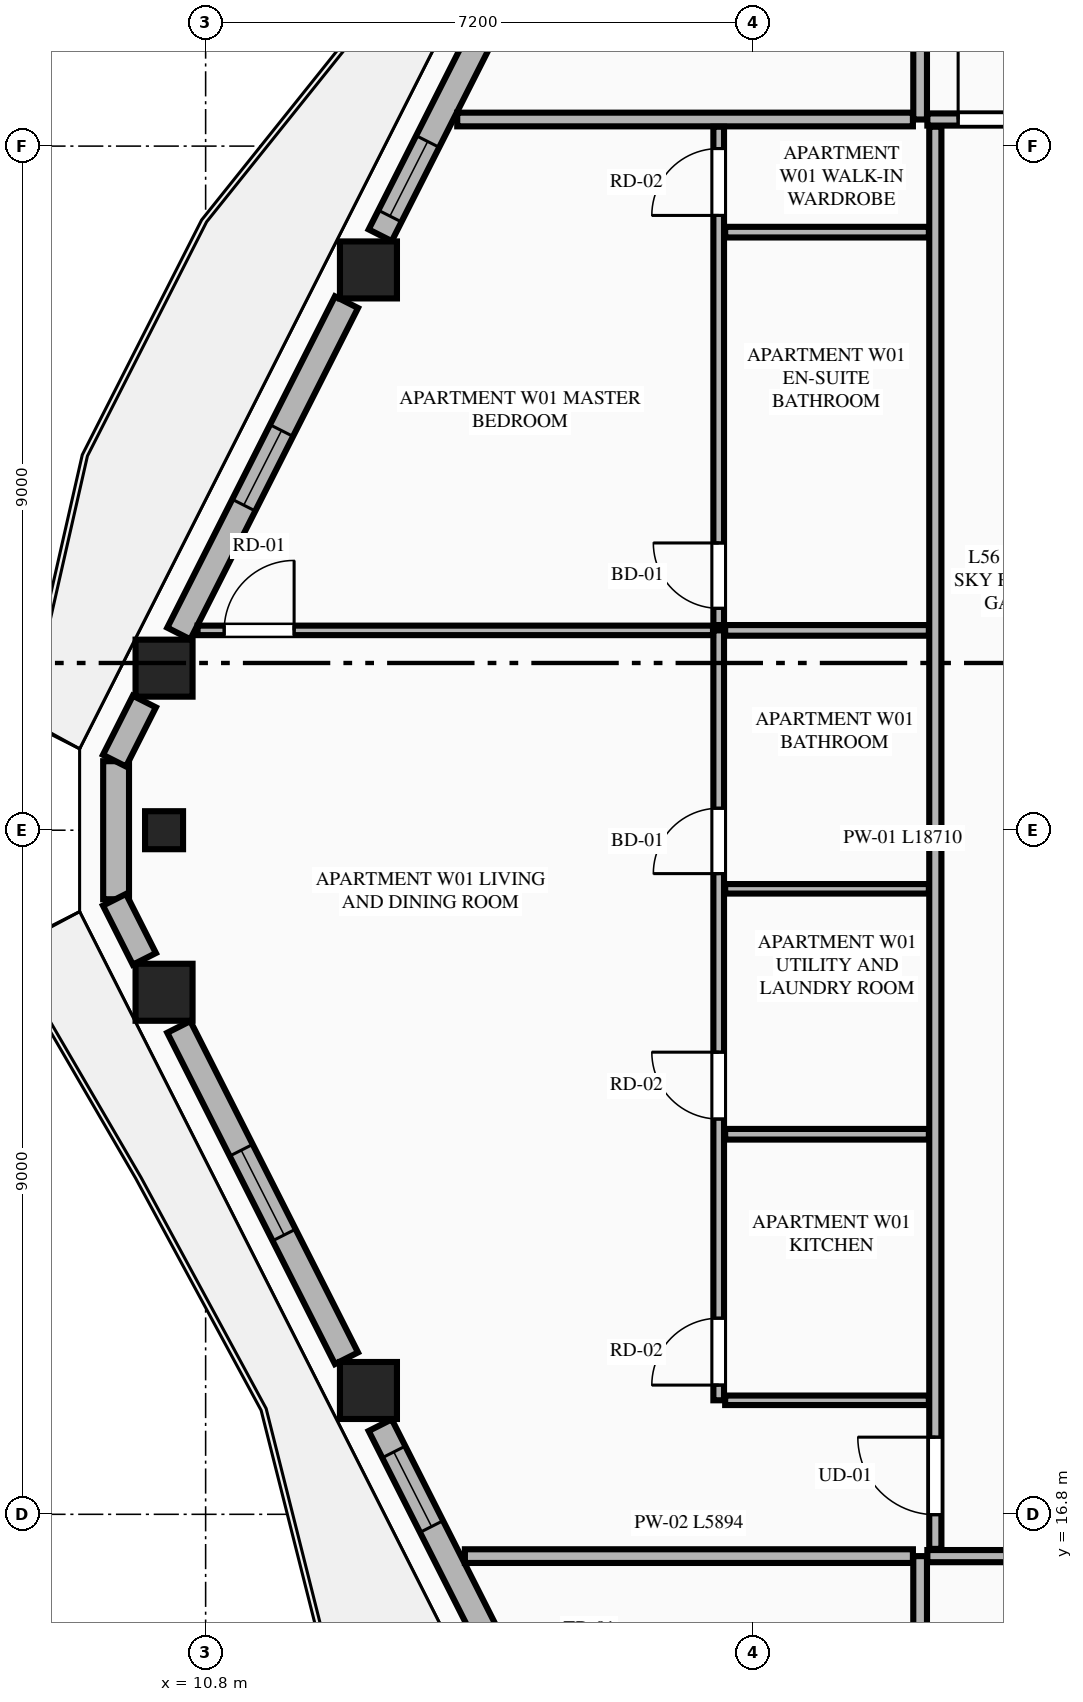
"""IFC4 building model, lengths in metres.
Left out: names, types, materials, properties, quantities, classifications, styles, units other than length and angle.
Written with IfcOpenShell. Run it as: python <this file> out.ifc"""

import sys

from ifc_helpers import new_model, si_unit, direction, frame, frame_2d, origin, origin_2d, place, context, subcontext, project, spatial, rectangle, extrude, element, fill, save


model = new_model("IFC4")
c1 = context("Model", 3, precision=1e-05, world=origin(), true_north=direction((0.0, 1.0)))
c2 = subcontext(c1, "Body", "Model", "MODEL_VIEW")
j1 = project(units=[si_unit("LENGTHUNIT", "METRE"), si_unit("PLANEANGLEUNIT", "RADIAN")], contexts=[c1])
p1 = place(None, origin())
s1 = spatial("IfcSite", under=j1, at=p1, CompositionType="ELEMENT")
p2 = place(p1, origin())
s2 = spatial("IfcBuilding", under=s1, at=p2, CompositionType="ELEMENT")
p3 = place(p2, frame((0.0, 0.0, 210.95)))
s3 = spatial("IfcBuildingStorey", under=s2, at=p3, CompositionType="ELEMENT", Elevation=210.95)
for number, where, z_axis, x_axis in (
    (1, (12.942, 33.171, 0.0), (0.0, 0.0, 1.0), (1.0, 0.0, 0.0)),
    (2, (10.253, 27.932, 0.0), (0.0, 0.0, 1.0), (1.0, 0.0, 0.0)),
    (3, (10.253, 23.668, 0.0), (0.0, 0.0, 1.0), (1.0, 0.0, 0.0)),
    (4, (12.942, 18.429, 0.0), (0.0, 0.0, 1.0), (1.0, 0.0, 0.0)),
):
    element("IfcColumn", number, at=place(p3, frame(where, z_axis=z_axis, x_axis=x_axis)), inside=s3, PredefinedType="COLUMN", context=c2, shape_type="SweptSolid", body=[
        extrude(rectangle(XDim=0.75, YDim=0.75, at=origin_2d()), origin(), (0.0, 0.0, 1.0), 3.55),
    ])
p4 = place(p3, frame((10.253, 25.8, 0.0), z_axis=(0.0, 0.0, 1.0), x_axis=(0.0, -1.0, 0.0)))
e5 = element("IfcColumn", 5, at=p4, inside=s3, PredefinedType="PILASTER", context=c2, shape_type="SweptSolid", body=[
    extrude(rectangle(XDim=0.5, YDim=0.35, at=origin_2d()), origin(), (0.0, 0.0, 1.0), 3.55),
])
p5 = place(p3, frame((9.622, 26.708, 0.0), z_axis=(0.0, 0.0, 1.0), x_axis=(0.0, -1.0, 0.0)))
e6 = element("IfcWall", 6, at=p5, inside=s3, PredefinedType="STANDARD", context=c2, shape_type="SweptSolid", body=[
    extrude(rectangle(XDim=1.816, YDim=0.34, at=frame_2d((0.908, 0.0))), origin(), (0.0, 0.0, 1.0), 3.35),
])
p6 = place(p3, frame((15.397, 38.173, 0.0), z_axis=(0.0, 0.0, 1.0), x_axis=(-0.451444616922, -0.892299141461, 0.0)))
e7 = element("IfcWall", 7, at=p6, inside=s3, PredefinedType="STANDARD", context=c2, shape_type="SweptSolid", body=[
    extrude(rectangle(XDim=5.095, YDim=0.34, at=frame_2d((2.547, 0.0))), origin(), (0.0, 0.0, 1.0), 2.883),
])
p7 = place(p6, frame((1.019, 0.0, 0.0)))
e8 = element("IfcOpeningElement", 8, at=p7, cuts=e7, PredefinedType="OPENING", context=c2, shape_type="SweptSolid", body=[
    extrude(rectangle(XDim=1.1, YDim=2.25, at=frame_2d((0.55, 1.125))), frame((0.0, 0.18, 0.0), z_axis=(0.0, -1.0, 0.0), x_axis=(1.0, 0.0, 0.0)), (0.0, 0.0, 1.0), 0.36),
])
p8 = place(p6, frame((3.712, 0.0, 0.75)))
e9 = element("IfcOpeningElement", 9, at=p8, cuts=e7, PredefinedType="OPENING", context=c2, shape_type="SweptSolid", body=[
    extrude(rectangle(XDim=1.1, YDim=1.983, at=frame_2d((0.55, 0.991))), frame((0.0, 0.18, 0.0), z_axis=(0.0, -1.0, 0.0), x_axis=(1.0, 0.0, 0.0)), (0.0, 0.0, 1.0), 0.36),
])
p9 = place(p3, frame((12.653, 32.747, 0.0), z_axis=(0.0, 0.0, 1.0), x_axis=(-0.451545895749, -0.892247893824, 0.0)))
e10 = element("IfcWall", 10, at=p9, inside=s3, PredefinedType="STANDARD", context=c2, shape_type="SweptSolid", body=[
    extrude(rectangle(XDim=4.885, YDim=0.34, at=frame_2d((2.443, 0.0))), origin(), (0.0, 0.0, 1.0), 2.883),
])
p10 = place(p9, frame((1.893, 0.0, 0.75)))
e11 = element("IfcOpeningElement", 11, at=p10, cuts=e10, PredefinedType="OPENING", context=c2, shape_type="SweptSolid", body=[
    extrude(rectangle(XDim=1.1, YDim=1.983, at=frame_2d((0.55, 0.991))), frame((0.0, 0.18, 0.0), z_axis=(0.0, -1.0, 0.0), x_axis=(1.0, 0.0, 0.0)), (0.0, 0.0, 1.0), 0.36),
])
p11 = place(p3, frame((9.994, 27.493, 0.0), z_axis=(0.0, 0.0, 1.0), x_axis=(-0.450796198004, -0.892626902947, 0.0)))
e12 = element("IfcWall", 12, at=p11, inside=s3, PredefinedType="STANDARD", context=c2, shape_type="SweptSolid", body=[
    extrude(rectangle(XDim=0.871, YDim=0.34, at=frame_2d((0.436, 0.0))), origin(), (0.0, 0.0, 1.0), 3.35),
])
p12 = place(p3, frame((9.601, 24.885, 0.0), z_axis=(0.0, 0.0, 1.0), x_axis=(0.450683483537, -0.892683817299, 0.0)))
e13 = element("IfcWall", 13, at=p12, inside=s3, PredefinedType="STANDARD", context=c2, shape_type="SweptSolid", body=[
    extrude(rectangle(XDim=0.872, YDim=0.34, at=frame_2d((0.436, 0.0))), origin(), (0.0, 0.0, 1.0), 3.35),
])
p13 = place(p3, frame((10.447, 23.212, 0.0), z_axis=(0.0, 0.0, 1.0), x_axis=(0.451566029745, -0.892237704191, 0.0)))
e14 = element("IfcWall", 14, at=p13, inside=s3, PredefinedType="STANDARD", context=c2, shape_type="SweptSolid", body=[
    extrude(rectangle(XDim=4.885, YDim=0.34, at=frame_2d((2.443, 0.0))), origin(), (0.0, 0.0, 1.0), 2.883),
])
p14 = place(p13, frame((1.818, 0.0, 0.75)))
e15 = element("IfcOpeningElement", 15, at=p14, cuts=e14, PredefinedType="OPENING", context=c2, shape_type="SweptSolid", body=[
    extrude(rectangle(XDim=1.25, YDim=1.95, at=frame_2d((0.625, 0.975))), frame((0.0, 0.18, 0.0), z_axis=(0.0, -1.0, 0.0), x_axis=(1.0, 0.0, 0.0)), (0.0, 0.0, 1.0), 0.36),
])
p15 = place(p3, frame((13.097, 17.973, 0.0), z_axis=(0.0, 0.0, 1.0), x_axis=(0.451463920536, -0.892289374841, 0.0)))
e16 = element("IfcWall", 16, at=p15, inside=s3, PredefinedType="STANDARD", context=c2, shape_type="SweptSolid", body=[
    extrude(rectangle(XDim=5.095, YDim=0.34, at=frame_2d((2.547, 0.0))), origin(), (0.0, 0.0, 1.0), 2.883),
])
p16 = place(p15, frame((3.088, 0.0, 0.0)))
e17 = element("IfcOpeningElement", 17, at=p16, cuts=e16, PredefinedType="OPENING", context=c2, shape_type="SweptSolid", body=[
    extrude(rectangle(XDim=1.1, YDim=2.25, at=frame_2d((0.55, 1.125))), frame((0.0, 0.18, 0.0), z_axis=(0.0, -1.0, 0.0), x_axis=(1.0, 0.0, 0.0)), (0.0, 0.0, 1.0), 0.36),
])
p17 = place(p15, frame((0.395, 0.0, 0.75)))
e18 = element("IfcOpeningElement", 18, at=p17, cuts=e16, PredefinedType="OPENING", context=c2, shape_type="SweptSolid", body=[
    extrude(rectangle(XDim=1.1, YDim=1.983, at=frame_2d((0.55, 0.991))), frame((0.0, 0.18, 0.0), z_axis=(0.0, -1.0, 0.0), x_axis=(1.0, 0.0, 0.0)), (0.0, 0.0, 1.0), 0.36),
])
p18 = place(p3, frame((20.2, 5.968, 0.0), z_axis=(0.0, 0.0, 1.0), x_axis=(0.0, 1.0, 0.0)))
e19 = element("IfcWall", 19, at=p18, inside=s3, PredefinedType="PARTITIONING", context=c2, shape_type="SweptSolid", body=[
    extrude(rectangle(XDim=10.282, YDim=0.18, at=frame_2d((5.141, 0.0))), origin(), (0.0, 0.0, 1.0), 3.35),
])
p19 = place(p3, frame((20.295, 16.25, 0.0), z_axis=(0.0, 0.0, 1.0), x_axis=(1.0, 0.0, 0.0)))
e20 = element("IfcWall", 20, at=p19, inside=s3, PredefinedType="PARTITIONING", context=c2, shape_type="SweptSolid", body=[
    extrude(rectangle(XDim=24.21, YDim=0.16, at=frame_2d((12.105, 0.0))), origin(), (0.0, 0.0, 1.0), 3.35),
])
p20 = place(p19, frame((22.005, 0.0, 0.0)))
e21 = element("IfcOpeningElement", 21, at=p20, cuts=e20, PredefinedType="OPENING", context=c2, shape_type="SweptSolid", body=[
    extrude(rectangle(XDim=1.02, YDim=2.25, at=frame_2d((0.51, 1.125))), frame((0.0, 0.09, 0.0), z_axis=(0.0, -1.0, 0.0), x_axis=(1.0, 0.0, 0.0)), (0.0, 0.0, 1.0), 0.18),
])
p21 = place(p3, frame((20.2, 35.15, 0.0), z_axis=(0.0, 0.0, 1.0), x_axis=(0.0, 1.0, 0.0)))
e22 = element("IfcWall", 22, at=p21, inside=s3, PredefinedType="PARTITIONING", context=c2, shape_type="SweptSolid", body=[
    extrude(rectangle(XDim=10.482, YDim=0.18, at=frame_2d((5.241, 0.0))), origin(), (0.0, 0.0, 1.0), 3.35),
])
p22 = place(p3, frame((20.295, 35.15, 0.0), z_axis=(0.0, 0.0, 1.0), x_axis=(1.0, 0.0, 0.0)))
e23 = element("IfcWall", 23, at=p22, inside=s3, PredefinedType="PARTITIONING", context=c2, shape_type="SweptSolid", body=[
    extrude(rectangle(XDim=24.21, YDim=0.16, at=frame_2d((12.105, 0.0))), origin(), (0.0, 0.0, 1.0), 3.35),
])
p23 = place(p22, frame((0.405, 0.0, 0.0)))
e24 = element("IfcOpeningElement", 24, at=p23, cuts=e23, PredefinedType="OPENING", context=c2, shape_type="SweptSolid", body=[
    extrude(rectangle(XDim=1.35, YDim=2.35, at=frame_2d((0.675, 1.175))), frame((0.0, 0.09, 0.0), z_axis=(0.0, -1.0, 0.0), x_axis=(1.0, 0.0, 0.0)), (0.0, 0.0, 1.0), 0.18),
])
p24 = place(p3, frame((14.211, 16.25, 0.0), z_axis=(0.0, 0.0, 1.0), x_axis=(1.0, 0.0, 0.0)))
e25 = element("IfcWall", 25, at=p24, inside=s3, PredefinedType="PARTITIONING", context=c2, shape_type="SweptSolid", body=[
    extrude(rectangle(XDim=5.894, YDim=0.18, at=frame_2d((2.947, 0.0))), origin(), (0.0, 0.0, 1.0), 3.35),
])
p25 = place(p3, frame((14.11, 35.15, 0.0), z_axis=(0.0, 0.0, 1.0), x_axis=(1.0, 0.0, 0.0)))
e26 = element("IfcWall", 26, at=p25, inside=s3, PredefinedType="PARTITIONING", context=c2, shape_type="SweptSolid", body=[
    extrude(rectangle(XDim=5.995, YDim=0.18, at=frame_2d((2.998, 0.0))), origin(), (0.0, 0.0, 1.0), 3.35),
])
p26 = place(p3, frame((20.4, 16.345, 0.0), z_axis=(0.0, 0.0, 1.0), x_axis=(0.0, 1.0, 0.0)))
e27 = element("IfcWall", 27, at=p26, inside=s3, PredefinedType="PARTITIONING", context=c2, shape_type="SweptSolid", body=[
    extrude(rectangle(XDim=18.71, YDim=0.16, at=frame_2d((9.355, 0.0))), origin(), (0.0, 0.0, 1.0), 3.35),
])
p27 = place(p26, frame((0.45, 0.0, 0.0)))
e28 = element("IfcOpeningElement", 28, at=p27, cuts=e27, PredefinedType="OPENING", context=c2, shape_type="SweptSolid", body=[
    extrude(rectangle(XDim=1.02, YDim=2.25, at=frame_2d((0.51, 1.125))), frame((0.0, 0.09, 0.0), z_axis=(0.0, -1.0, 0.0), x_axis=(1.0, 0.0, 0.0)), (0.0, 0.0, 1.0), 0.18),
])
p28 = place(p3, frame((17.635, 18.3, 0.0), z_axis=(0.0, 0.0, 1.0), x_axis=(1.0, 0.0, 0.0)))
e29 = element("IfcWall", 29, at=p28, inside=s3, PredefinedType="PARTITIONING", context=c2, shape_type="SweptSolid", body=[
    extrude(rectangle(XDim=2.68, YDim=0.125, at=frame_2d((1.34, 0.0))), origin(), (0.0, 0.0, 1.0), 2.807),
])
p29 = place(p3, frame((17.55, 18.3, 0.0), z_axis=(0.0, 0.0, 1.0), x_axis=(0.0, 1.0, 0.0)))
e30 = element("IfcWall", 30, at=p29, inside=s3, PredefinedType="PLUMBINGWALL", context=c2, shape_type="SweptSolid", body=[
    extrude(rectangle(XDim=10.129, YDim=0.14, at=frame_2d((5.064, 0.0))), origin(), (0.0, 0.0, 1.0), 3.35),
])
p30 = place(p29, frame((0.2, 0.0, 0.0)))
e31 = element("IfcOpeningElement", 31, at=p30, cuts=e30, PredefinedType="OPENING", context=c2, shape_type="SweptSolid", body=[
    extrude(rectangle(XDim=0.88, YDim=2.15, at=frame_2d((0.44, 1.075))), frame((0.0, 0.08, 0.0), z_axis=(0.0, -1.0, 0.0), x_axis=(1.0, 0.0, 0.0)), (0.0, 0.0, 1.0), 0.16),
])
p31 = place(p29, frame((3.7, 0.0, 0.0)))
e32 = element("IfcOpeningElement", 32, at=p31, cuts=e30, PredefinedType="OPENING", context=c2, shape_type="SweptSolid", body=[
    extrude(rectangle(XDim=0.88, YDim=2.15, at=frame_2d((0.44, 1.075))), frame((0.0, 0.08, 0.0), z_axis=(0.0, -1.0, 0.0), x_axis=(1.0, 0.0, 0.0)), (0.0, 0.0, 1.0), 0.16),
])
p32 = place(p29, frame((6.929, 0.0, 0.0)))
e33 = element("IfcOpeningElement", 33, at=p32, cuts=e30, PredefinedType="OPENING", context=c2, shape_type="SweptSolid", body=[
    extrude(rectangle(XDim=0.86, YDim=2.1, at=frame_2d((0.43, 1.05))), frame((0.0, 0.08, 0.0), z_axis=(0.0, -1.0, 0.0), x_axis=(1.0, 0.0, 0.0)), (0.0, 0.0, 1.0), 0.16),
])
p33 = place(p3, frame((17.55, 28.499, 0.0), z_axis=(0.0, 0.0, 1.0), x_axis=(0.0, 1.0, 0.0)))
e34 = element("IfcWall", 34, at=p33, inside=s3, PredefinedType="PLUMBINGWALL", context=c2, shape_type="SweptSolid", body=[
    extrude(rectangle(XDim=6.556, YDim=0.14, at=frame_2d((3.278, 0.0))), origin(), (0.0, 0.0, 1.0), 3.35),
])
p34 = place(p33, frame((0.22, 0.0, 0.0)))
e35 = element("IfcOpeningElement", 35, at=p34, cuts=e34, PredefinedType="OPENING", context=c2, shape_type="SweptSolid", body=[
    extrude(rectangle(XDim=0.86, YDim=2.1, at=frame_2d((0.43, 1.05))), frame((0.0, 0.08, 0.0), z_axis=(0.0, -1.0, 0.0), x_axis=(1.0, 0.0, 0.0)), (0.0, 0.0, 1.0), 0.16),
])
p35 = place(p33, frame((5.389, 0.0, 0.0)))
e36 = element("IfcOpeningElement", 36, at=p35, cuts=e34, PredefinedType="OPENING", context=c2, shape_type="SweptSolid", body=[
    extrude(rectangle(XDim=0.88, YDim=2.15, at=frame_2d((0.44, 1.075))), frame((0.0, 0.08, 0.0), z_axis=(0.0, -1.0, 0.0), x_axis=(1.0, 0.0, 0.0)), (0.0, 0.0, 1.0), 0.16),
])
p36 = place(p3, frame((17.635, 28.429, 0.0), z_axis=(0.0, 0.0, 1.0), x_axis=(1.0, 0.0, 0.0)))
e37 = element("IfcWall", 37, at=p36, inside=s3, PredefinedType="PLUMBINGWALL", context=c2, shape_type="SweptSolid", body=[
    extrude(rectangle(XDim=2.68, YDim=0.14, at=frame_2d((1.34, 0.0))), origin(), (0.0, 0.0, 1.0), 3.35),
])
p37 = place(p3, frame((10.694, 28.429, 0.0), z_axis=(0.0, 0.0, 1.0), x_axis=(1.0, 0.0, 0.0)))
e38 = element("IfcWall", 38, at=p37, inside=s3, PredefinedType="PARTITIONING", context=c2, shape_type="SweptSolid", body=[
    extrude(rectangle(XDim=6.781, YDim=0.125, at=frame_2d((3.391, 0.0))), origin(), (0.0, 0.0, 1.0), 3.35),
])
p38 = place(p37, frame((0.35, 0.0, 0.0)))
e39 = element("IfcOpeningElement", 39, at=p38, cuts=e38, PredefinedType="OPENING", context=c2, shape_type="SweptSolid", body=[
    extrude(rectangle(XDim=0.92, YDim=2.15, at=frame_2d((0.46, 1.075))), frame((0.0, 0.073, 0.0), z_axis=(0.0, -1.0, 0.0), x_axis=(1.0, 0.0, 0.0)), (0.0, 0.0, 1.0), 0.145),
])
p39 = place(p3, frame((17.635, 21.8, 0.0), z_axis=(0.0, 0.0, 1.0), x_axis=(1.0, 0.0, 0.0)))
e40 = element("IfcWall", 40, at=p39, inside=s3, PredefinedType="PLUMBINGWALL", context=c2, shape_type="SweptSolid", body=[
    extrude(rectangle(XDim=2.68, YDim=0.14, at=frame_2d((1.34, 0.0))), origin(), (0.0, 0.0, 1.0), 3.35),
])
p40 = place(p3, frame((17.635, 25.029, 0.0), z_axis=(0.0, 0.0, 1.0), x_axis=(1.0, 0.0, 0.0)))
e41 = element("IfcWall", 41, at=p40, inside=s3, PredefinedType="PARTITIONING", context=c2, shape_type="SweptSolid", body=[
    extrude(rectangle(XDim=2.68, YDim=0.125, at=frame_2d((1.34, 0.0))), origin(), (0.0, 0.0, 1.0), 3.35),
])
p41 = place(p3, frame((17.635, 33.668, 0.0), z_axis=(0.0, 0.0, 1.0), x_axis=(1.0, 0.0, 0.0)))
e42 = element("IfcWall", 42, at=p41, inside=s3, PredefinedType="PLUMBINGWALL", context=c2, shape_type="SweptSolid", body=[
    extrude(rectangle(XDim=2.68, YDim=0.14, at=frame_2d((1.34, 0.0))), origin(), (0.0, 0.0, 1.0), 3.35),
])
p42 = place(p10, origin())
e43 = element("IfcWindow", 43, at=p42, inside=s3, PartitioningType="SINGLE_PANEL", PredefinedType="WINDOW", context=c2, shape_type="SweptSolid", body=[
    extrude(rectangle(XDim=1.1, YDim=1.983, at=frame_2d((0.55, 0.991))), frame((0.0, 0.03, 0.0), z_axis=(0.0, -1.0, 0.0), x_axis=(1.0, 0.0, 0.0)), (0.0, 0.0, 1.0), 0.06),
])
fill(e11, e43)
p43 = place(p14, origin())
e44 = element("IfcWindow", 44, at=p43, inside=s3, PartitioningType="SINGLE_PANEL", PredefinedType="WINDOW", context=c2, shape_type="SweptSolid", body=[
    extrude(rectangle(XDim=1.25, YDim=1.95, at=frame_2d((0.625, 0.975))), frame((0.0, 0.03, 0.0), z_axis=(0.0, -1.0, 0.0), x_axis=(1.0, 0.0, 0.0)), (0.0, 0.0, 1.0), 0.06),
])
fill(e15, e44)
p44 = place(p23, origin())
e45 = element("IfcDoor", 45, at=p44, inside=s3, OperationType="SINGLE_SWING_LEFT", PredefinedType="DOOR", context=c2, shape_type="SweptSolid", body=[
    extrude(rectangle(XDim=1.35, YDim=2.35, at=frame_2d((0.675, 1.175))), frame((0.0, 0.025, 0.0), z_axis=(0.0, -1.0, 0.0), x_axis=(1.0, 0.0, 0.0)), (0.0, 0.0, 1.0), 0.05),
])
fill(e24, e45)
p45 = place(p30, origin())
e46 = element("IfcDoor", 46, at=p45, inside=s3, OperationType="SINGLE_SWING_LEFT", PredefinedType="DOOR", context=c2, shape_type="SweptSolid", body=[
    extrude(rectangle(XDim=0.88, YDim=2.15, at=frame_2d((0.44, 1.075))), frame((0.0, 0.025, 0.0), z_axis=(0.0, -1.0, 0.0), x_axis=(1.0, 0.0, 0.0)), (0.0, 0.0, 1.0), 0.05),
])
fill(e31, e46)
p46 = place(p31, origin())
e47 = element("IfcDoor", 47, at=p46, inside=s3, OperationType="SINGLE_SWING_RIGHT", PredefinedType="DOOR", context=c2, shape_type="SweptSolid", body=[
    extrude(rectangle(XDim=0.88, YDim=2.15, at=frame_2d((0.44, 1.075))), frame((0.0, 0.025, 0.0), z_axis=(0.0, -1.0, 0.0), x_axis=(1.0, 0.0, 0.0)), (0.0, 0.0, 1.0), 0.05),
])
fill(e32, e47)
p47 = place(p32, origin())
e48 = element("IfcDoor", 48, at=p47, inside=s3, OperationType="SINGLE_SWING_LEFT", PredefinedType="DOOR", context=c2, shape_type="SweptSolid", body=[
    extrude(rectangle(XDim=0.86, YDim=2.1, at=frame_2d((0.43, 1.05))), frame((0.0, 0.025, 0.0), z_axis=(0.0, -1.0, 0.0), x_axis=(1.0, 0.0, 0.0)), (0.0, 0.0, 1.0), 0.05),
])
fill(e33, e48)
p48 = place(p34, origin())
e49 = element("IfcDoor", 49, at=p48, inside=s3, OperationType="SINGLE_SWING_RIGHT", PredefinedType="DOOR", context=c2, shape_type="SweptSolid", body=[
    extrude(rectangle(XDim=0.86, YDim=2.1, at=frame_2d((0.43, 1.05))), frame((0.0, 0.025, 0.0), z_axis=(0.0, -1.0, 0.0), x_axis=(1.0, 0.0, 0.0)), (0.0, 0.0, 1.0), 0.05),
])
fill(e35, e49)
p49 = place(p35, origin())
e50 = element("IfcDoor", 50, at=p49, inside=s3, OperationType="SINGLE_SWING_LEFT", PredefinedType="DOOR", context=c2, shape_type="SweptSolid", body=[
    extrude(rectangle(XDim=0.88, YDim=2.15, at=frame_2d((0.44, 1.075))), frame((0.0, 0.025, 0.0), z_axis=(0.0, -1.0, 0.0), x_axis=(1.0, 0.0, 0.0)), (0.0, 0.0, 1.0), 0.05),
])
fill(e36, e50)
p50 = place(p27, origin())
e51 = element("IfcDoor", 51, at=p50, inside=s3, OperationType="SINGLE_SWING_RIGHT", PredefinedType="DOOR", context=c2, shape_type="SweptSolid", body=[
    extrude(rectangle(XDim=1.02, YDim=2.25, at=frame_2d((0.51, 1.125))), frame((0.0, 0.025, 0.0), z_axis=(0.0, -1.0, 0.0), x_axis=(1.0, 0.0, 0.0)), (0.0, 0.0, 1.0), 0.05),
])
fill(e28, e51)
p51 = place(p38, origin())
e52 = element("IfcDoor", 52, at=p51, inside=s3, OperationType="SINGLE_SWING_RIGHT", PredefinedType="DOOR", context=c2, shape_type="SweptSolid", body=[
    extrude(rectangle(XDim=0.92, YDim=2.15, at=frame_2d((0.46, 1.075))), frame((0.0, 0.025, 0.0), z_axis=(0.0, -1.0, 0.0), x_axis=(1.0, 0.0, 0.0)), (0.0, 0.0, 1.0), 0.05),
])
fill(e39, e52)
p52 = place(p8, origin())
e53 = element("IfcWindow", 53, at=p52, inside=s3, PartitioningType="SINGLE_PANEL", PredefinedType="WINDOW", context=c2, shape_type="SweptSolid", body=[
    extrude(rectangle(XDim=1.1, YDim=1.983, at=frame_2d((0.55, 0.991))), frame((0.0, 0.03, 0.0), z_axis=(0.0, -1.0, 0.0), x_axis=(1.0, 0.0, 0.0)), (0.0, 0.0, 1.0), 0.06),
])
fill(e9, e53)
p53 = place(p17, origin())
e54 = element("IfcWindow", 54, at=p53, inside=s3, PartitioningType="SINGLE_PANEL", PredefinedType="WINDOW", context=c2, shape_type="SweptSolid", body=[
    extrude(rectangle(XDim=1.1, YDim=1.983, at=frame_2d((0.55, 0.991))), frame((0.0, 0.03, 0.0), z_axis=(0.0, -1.0, 0.0), x_axis=(1.0, 0.0, 0.0)), (0.0, 0.0, 1.0), 0.06),
])
fill(e18, e54)
save(model, sys.argv[1])
